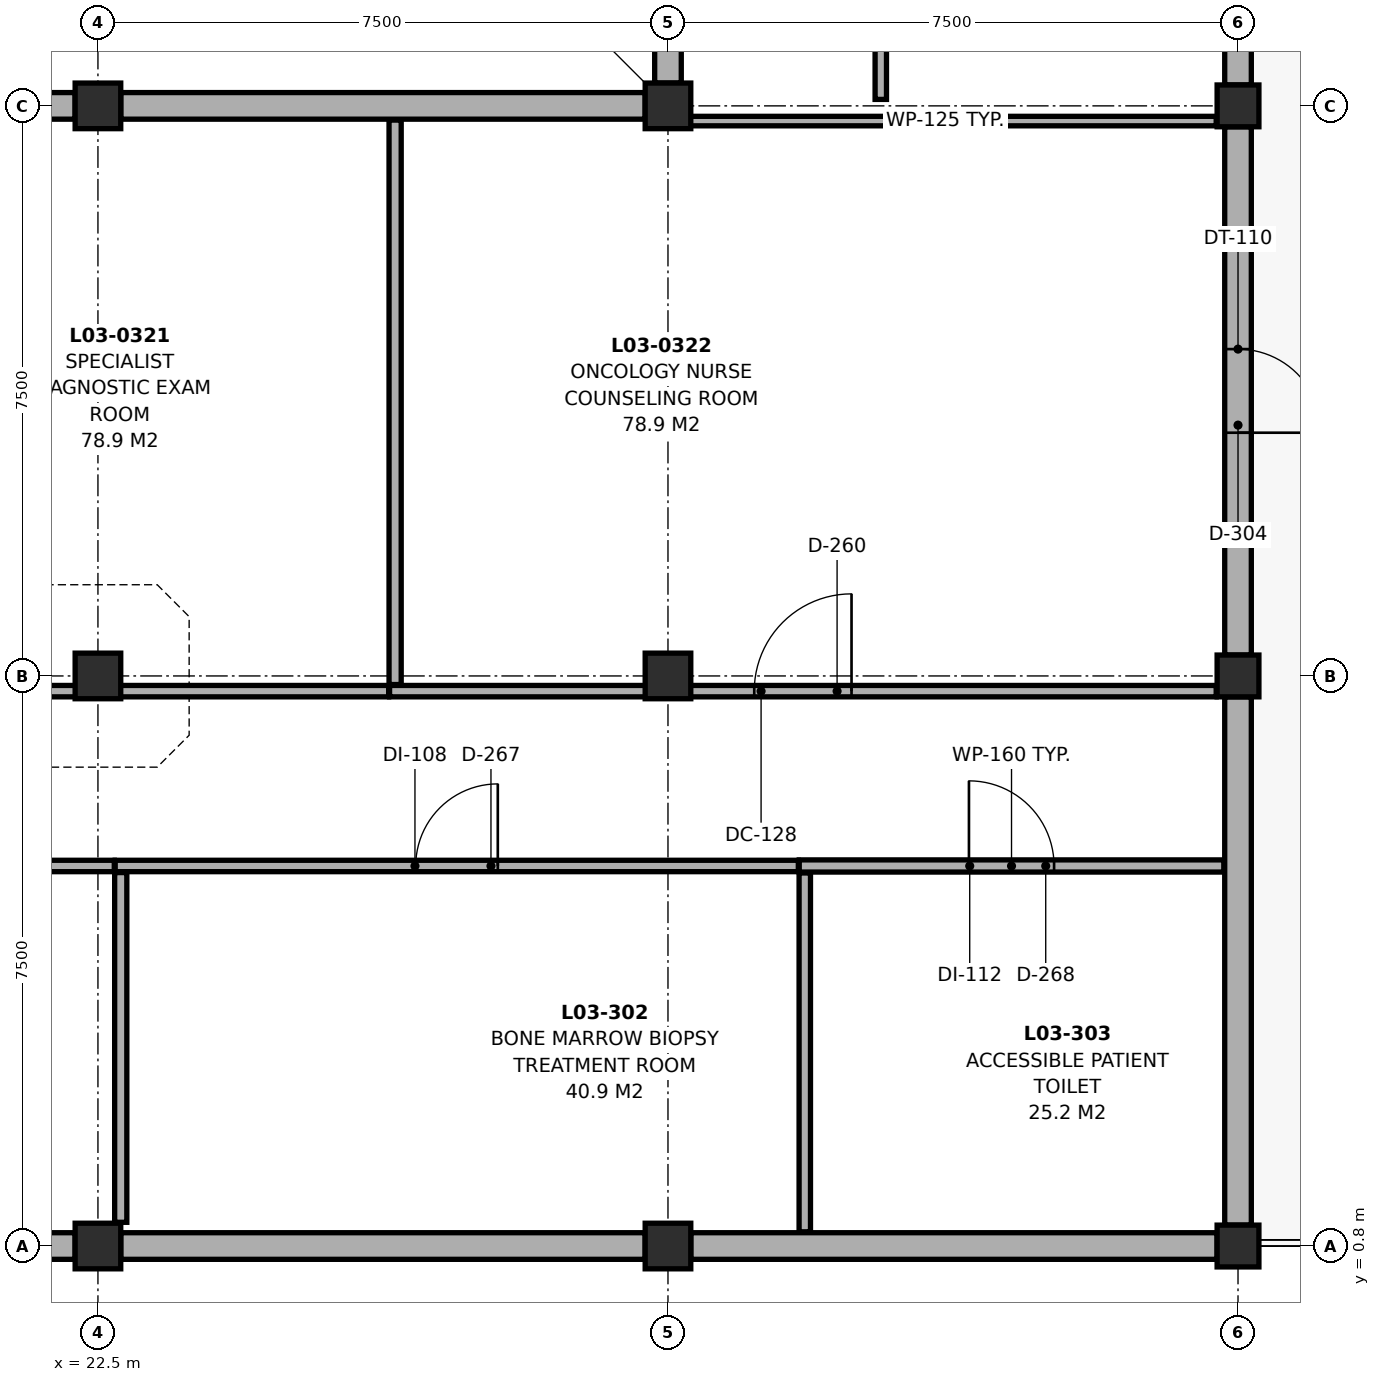
"""IFC4 building model, lengths in metres.
Left out: names, types, materials, properties, quantities, classifications, styles, units other than length and angle.
Written with IfcOpenShell. Run it as: python <this file> out.ifc"""

import sys

from ifc_helpers import new_model, si_unit, direction, frame, frame_2d, origin, origin_2d, place, context, subcontext, project, spatial, rectangle, extrude, element, fill, save


model = new_model("IFC4")
c1 = context("Model", 3, precision=1e-05, world=origin(), true_north=direction((0.0, 1.0)))
c2 = subcontext(c1, "Body", "Model", "MODEL_VIEW")
j1 = project(units=[si_unit("LENGTHUNIT", "METRE"), si_unit("PLANEANGLEUNIT", "RADIAN")], contexts=[c1])
p1 = place(None, origin())
s1 = spatial("IfcSite", under=j1, at=p1, CompositionType="ELEMENT")
p2 = place(p1, origin())
s2 = spatial("IfcBuilding", under=s1, at=p2, CompositionType="ELEMENT")
p3 = place(p2, frame((0.0, 0.0, 13.5)))
s3 = spatial("IfcBuildingStorey", under=s2, at=p3, CompositionType="ELEMENT", Elevation=13.5)
for number, where, z_axis, x_axis in (
    (1, (22.5, 0.8, 0.0), (0.0, 0.0, 1.0), (1.0, 0.0, 0.0)),
    (2, (22.5, 8.3, 0.0), (0.0, 0.0, 1.0), (1.0, 0.0, 0.0)),
    (3, (22.5, 15.8, 0.0), (0.0, 0.0, 1.0), (1.0, 0.0, 0.0)),
    (4, (30.0, 0.8, 0.0), (0.0, 0.0, 1.0), (1.0, 0.0, 0.0)),
    (5, (30.0, 8.3, 0.0), (0.0, 0.0, 1.0), (1.0, 0.0, 0.0)),
    (6, (30.0, 15.8, 0.0), (0.0, 0.0, 1.0), (1.0, 0.0, 0.0)),
):
    element("IfcColumn", number, at=place(p3, frame(where, z_axis=z_axis, x_axis=x_axis)), inside=s3, PredefinedType="COLUMN", context=c2, shape_type="SweptSolid", body=[
        extrude(rectangle(XDim=0.6, YDim=0.6, at=origin_2d()), origin(), (0.0, 0.0, 1.0), 3.72),
    ])
for number, where, z_axis, x_axis in (
    (7, (37.5, 0.8, 0.0), (0.0, 0.0, 1.0), (1.0, 0.0, 0.0)),
    (8, (37.5, 8.3, 0.0), (0.0, 0.0, 1.0), (1.0, 0.0, 0.0)),
    (9, (37.5, 15.8, 0.0), (0.0, 0.0, 1.0), (1.0, 0.0, 0.0)),
):
    element("IfcColumn", number, at=place(p3, frame(where, z_axis=z_axis, x_axis=x_axis)), inside=s3, PredefinedType="COLUMN", context=c2, shape_type="SweptSolid", body=[
        extrude(rectangle(XDim=0.55, YDim=0.55, at=origin_2d()), origin(), (0.0, 0.0, 1.0), 3.75),
    ])
p4 = place(p3, frame((37.5, 23.05, 0.0), z_axis=(0.0, 0.0, 1.0), x_axis=(0.0, -1.0, 0.0)))
e10 = element("IfcWall", 10, at=p4, inside=s3, PredefinedType="SOLIDWALL", context=c2, shape_type="SweptSolid", body=[
    extrude(rectangle(XDim=6.975, YDim=0.35, at=frame_2d((3.488, 0.0))), origin(), (0.0, 0.0, 1.0), 3.055),
])
p5 = place(p3, frame((37.5, 15.525, 0.0), z_axis=(0.0, 0.0, 1.0), x_axis=(0.0, -1.0, 0.0)))
e11 = element("IfcWall", 11, at=p5, inside=s3, PredefinedType="SOLIDWALL", context=c2, shape_type="SweptSolid", body=[
    extrude(rectangle(XDim=6.95, YDim=0.35, at=frame_2d((3.475, 0.0))), origin(), (0.0, 0.0, 1.0), 3.005),
])
p6 = place(p5, frame((2.925, 0.0, 0.0)))
e12 = element("IfcOpeningElement", 12, at=p6, cuts=e11, PredefinedType="OPENING", context=c2, shape_type="SweptSolid", body=[
    extrude(rectangle(XDim=1.1, YDim=2.15, at=frame_2d((0.55, 1.075))), frame((0.0, 0.187, 0.0), z_axis=(0.0, -1.0, 0.0), x_axis=(1.0, 0.0, 0.0)), (0.0, 0.0, 1.0), 0.374),
])
p7 = place(p3, frame((37.5, 8.025, 0.0), z_axis=(0.0, 0.0, 1.0), x_axis=(0.0, -1.0, 0.0)))
e13 = element("IfcWall", 13, at=p7, inside=s3, PredefinedType="SOLIDWALL", context=c2, shape_type="SweptSolid", body=[
    extrude(rectangle(XDim=6.95, YDim=0.35, at=frame_2d((3.475, 0.0))), origin(), (0.0, 0.0, 1.0), 3.005),
])
p8 = place(p3, frame((37.225, 0.8, 0.0), z_axis=(0.0, 0.0, 1.0), x_axis=(-1.0, 0.0, 0.0)))
e14 = element("IfcWall", 14, at=p8, inside=s3, PredefinedType="SOLIDWALL", context=c2, shape_type="SweptSolid", body=[
    extrude(rectangle(XDim=6.925, YDim=0.35, at=frame_2d((3.462, 0.0))), origin(), (0.0, 0.0, 1.0), 3.005),
])
p9 = place(p3, frame((29.7, 0.8, 0.0), z_axis=(0.0, 0.0, 1.0), x_axis=(-1.0, 0.0, 0.0)))
e15 = element("IfcWall", 15, at=p9, inside=s3, PredefinedType="SOLIDWALL", context=c2, shape_type="SweptSolid", body=[
    extrude(rectangle(XDim=6.9, YDim=0.35, at=frame_2d((3.45, 0.0))), origin(), (0.0, 0.0, 1.0), 2.805),
])
p10 = place(p3, frame((22.2, 0.8, 0.0), z_axis=(0.0, 0.0, 1.0), x_axis=(-1.0, 0.0, 0.0)))
e16 = element("IfcWall", 16, at=p10, inside=s3, PredefinedType="SOLIDWALL", context=c2, shape_type="SweptSolid", body=[
    extrude(rectangle(XDim=6.9, YDim=0.35, at=frame_2d((3.45, 0.0))), origin(), (0.0, 0.0, 1.0), 2.805),
])
p11 = place(p10, frame((2.65, 0.0, 0.9)))
e17 = element("IfcOpeningElement", 17, at=p11, cuts=e16, PredefinedType="OPENING", context=c2, shape_type="SweptSolid", body=[
    extrude(rectangle(XDim=1.6, YDim=1.3, at=frame_2d((0.8, 0.65))), frame((0.0, 0.187, 0.0), z_axis=(0.0, -1.0, 0.0), x_axis=(1.0, 0.0, 0.0)), (0.0, 0.0, 1.0), 0.374),
])
for number, where, z_axis, x_axis in (
    (18, (15.3, 15.8, 0.0), (0.0, 0.0, 1.0), (1.0, 0.0, 0.0)),
    (19, (22.8, 15.8, 0.0), (0.0, 0.0, 1.0), (1.0, 0.0, 0.0)),
):
    element("IfcWall", number, at=place(p3, frame(where, z_axis=z_axis, x_axis=x_axis)), inside=s3, PredefinedType="SOLIDWALL", context=c2, shape_type="SweptSolid", body=[
        extrude(rectangle(XDim=6.9, YDim=0.35, at=frame_2d((3.45, 0.0))), origin(), (0.0, 0.0, 1.0), 2.805),
    ])
p12 = place(p3, frame((30.0, 16.1, 0.0), z_axis=(0.0, 0.0, 1.0), x_axis=(0.0, 1.0, 0.0)))
e20 = element("IfcWall", 20, at=p12, inside=s3, PredefinedType="SOLIDWALL", context=c2, shape_type="SweptSolid", body=[
    extrude(rectangle(XDim=6.95, YDim=0.35, at=frame_2d((3.475, 0.0))), origin(), (0.0, 0.0, 1.0), 3.055),
])
p13 = place(p12, frame((2.575, 0.0, 0.9)))
e21 = element("IfcOpeningElement", 21, at=p13, cuts=e20, PredefinedType="OPENING", context=c2, shape_type="SweptSolid", body=[
    extrude(rectangle(XDim=1.8, YDim=1.7, at=frame_2d((0.9, 0.85))), frame((0.0, 0.187, 0.0), z_axis=(0.0, -1.0, 0.0), x_axis=(1.0, 0.0, 0.0)), (0.0, 0.0, 1.0), 0.374),
])
p14 = place(p3, frame((15.485, 5.8, 0.0), z_axis=(0.0, 0.0, 1.0), x_axis=(1.0, 0.0, 0.0)))
e22 = element("IfcWall", 22, at=p14, inside=s3, PredefinedType="PARTITIONING", context=c2, shape_type="SweptSolid", body=[
    extrude(rectangle(XDim=7.23, YDim=0.15, at=frame_2d((3.615, 0.0))), origin(), (0.0, 0.0, 1.0), 2.805),
])
p15 = place(p14, frame((3.125, 0.0, 0.0)))
e23 = element("IfcOpeningElement", 23, at=p15, cuts=e22, PredefinedType="OPENING", context=c2, shape_type="SweptSolid", body=[
    extrude(rectangle(XDim=0.98, YDim=2.12, at=frame_2d((0.49, 1.06))), frame((0.0, 0.087, 0.0), z_axis=(0.0, -1.0, 0.0), x_axis=(1.0, 0.0, 0.0)), (0.0, 0.0, 1.0), 0.174),
])
p16 = place(p3, frame((22.727, 5.8, 0.0), z_axis=(0.0, 0.0, 1.0), x_axis=(1.0, 0.0, 0.0)))
e24 = element("IfcWall", 24, at=p16, inside=s3, PredefinedType="PARTITIONING", context=c2, shape_type="SweptSolid", body=[
    extrude(rectangle(XDim=8.988, YDim=0.15, at=frame_2d((4.494, 0.0))), origin(), (0.0, 0.0, 1.0), 2.805),
])
p17 = place(p16, frame((3.954, 0.0, 0.0)))
e25 = element("IfcOpeningElement", 25, at=p17, cuts=e24, PredefinedType="OPENING", context=c2, shape_type="SweptSolid", body=[
    extrude(rectangle(XDim=1.08, YDim=2.18, at=frame_2d((0.54, 1.09))), frame((0.0, 0.087, 0.0), z_axis=(0.0, -1.0, 0.0), x_axis=(1.0, 0.0, 0.0)), (0.0, 0.0, 1.0), 0.174),
])
p18 = place(p3, frame((31.727, 5.8, 0.0), z_axis=(0.0, 0.0, 1.0), x_axis=(1.0, 0.0, 0.0)))
e26 = element("IfcWall", 26, at=p18, inside=s3, PredefinedType="PARTITIONING", context=c2, shape_type="SweptSolid", body=[
    extrude(rectangle(XDim=5.586, YDim=0.16, at=frame_2d((2.793, 0.0))), origin(), (0.0, 0.0, 1.0), 3.085),
])
p19 = place(p18, frame((2.233, 0.0, 0.0)))
e27 = element("IfcOpeningElement", 27, at=p19, cuts=e26, PredefinedType="OPENING", context=c2, shape_type="SweptSolid", body=[
    extrude(rectangle(XDim=1.12, YDim=2.2, at=frame_2d((0.56, 1.1))), frame((0.0, 0.092, 0.0), z_axis=(0.0, -1.0, 0.0), x_axis=(1.0, 0.0, 0.0)), (0.0, 0.0, 1.0), 0.184),
])
p20 = place(p3, frame((15.312, 8.1, 0.0), z_axis=(0.0, 0.0, 1.0), x_axis=(1.0, 0.0, 0.0)))
e28 = element("IfcWall", 28, at=p20, inside=s3, PredefinedType="PARTITIONING", context=c2, shape_type="SweptSolid", body=[
    extrude(rectangle(XDim=11.013, YDim=0.15, at=frame_2d((5.506, 0.0))), origin(), (0.0, 0.0, 1.0), 2.805),
])
p21 = place(p20, frame((4.886, 0.0, 0.0)))
e29 = element("IfcOpeningElement", 29, at=p21, cuts=e28, PredefinedType="OPENING", context=c2, shape_type="SweptSolid", body=[
    extrude(rectangle(XDim=1.24, YDim=2.2, at=frame_2d((0.62, 1.1))), frame((0.0, 0.087, 0.0), z_axis=(0.0, -1.0, 0.0), x_axis=(1.0, 0.0, 0.0)), (0.0, 0.0, 1.0), 0.174),
])
p22 = place(p3, frame((26.337, 8.1, 0.0), z_axis=(0.0, 0.0, 1.0), x_axis=(1.0, 0.0, 0.0)))
e30 = element("IfcWall", 30, at=p22, inside=s3, PredefinedType="PARTITIONING", context=c2, shape_type="SweptSolid", body=[
    extrude(rectangle(XDim=10.876, YDim=0.15, at=frame_2d((5.438, 0.0))), origin(), (0.0, 0.0, 1.0), 2.805),
])
p23 = place(p22, frame((4.798, 0.0, 0.0)))
e31 = element("IfcOpeningElement", 31, at=p23, cuts=e30, PredefinedType="OPENING", context=c2, shape_type="SweptSolid", body=[
    extrude(rectangle(XDim=1.28, YDim=2.22, at=frame_2d((0.64, 1.11))), frame((0.0, 0.087, 0.0), z_axis=(0.0, -1.0, 0.0), x_axis=(1.0, 0.0, 0.0)), (0.0, 0.0, 1.0), 0.174),
])
p24 = place(p3, frame((32.8, 15.885, 0.0), z_axis=(0.0, 0.0, 1.0), x_axis=(0.0, 1.0, 0.0)))
e32 = element("IfcWall", 32, at=p24, inside=s3, PredefinedType="PARTITIONING", context=c2, shape_type="SweptSolid", body=[
    extrude(rectangle(XDim=7.33, YDim=0.15, at=frame_2d((3.665, 0.0))), origin(), (0.0, 0.0, 1.0), 3.055),
])
p25 = place(p24, frame((2.945, 0.0, 0.0)))
e33 = element("IfcOpeningElement", 33, at=p25, cuts=e32, PredefinedType="OPENING", context=c2, shape_type="SweptSolid", body=[
    extrude(rectangle(XDim=1.44, YDim=2.32, at=frame_2d((0.72, 1.16))), frame((0.0, 0.087, 0.0), z_axis=(0.0, -1.0, 0.0), x_axis=(1.0, 0.0, 0.0)), (0.0, 0.0, 1.0), 0.174),
])
p26 = place(p3, frame((30.084, 15.6, 0.0), z_axis=(0.0, 0.0, 1.0), x_axis=(1.0, 0.0, 0.0)))
e34 = element("IfcWall", 34, at=p26, inside=s3, PredefinedType="PARTITIONING", context=c2, shape_type="SweptSolid", body=[
    extrude(rectangle(XDim=7.128, YDim=0.125, at=frame_2d((3.564, 0.0))), origin(), (0.0, 0.0, 1.0), 3.005),
])
p27 = place(p3, frame((22.8, 1.112, 0.0), z_axis=(0.0, 0.0, 1.0), x_axis=(0.0, 1.0, 0.0)))
e35 = element("IfcWall", 35, at=p27, inside=s3, PredefinedType="PARTITIONING", context=c2, shape_type="SweptSolid", body=[
    extrude(rectangle(XDim=4.601, YDim=0.16, at=frame_2d((2.3, 0.0))), origin(), (0.0, 0.0, 1.0), 2.805),
])
p28 = place(p3, frame((31.8, 0.987, 0.0), z_axis=(0.0, 0.0, 1.0), x_axis=(0.0, 1.0, 0.0)))
e36 = element("IfcWall", 36, at=p28, inside=s3, PredefinedType="PARTITIONING", context=c2, shape_type="SweptSolid", body=[
    extrude(rectangle(XDim=4.721, YDim=0.15, at=frame_2d((2.36, 0.0))), origin(), (0.0, 0.0, 1.0), 3.055),
])
p29 = place(p3, frame((26.41, 8.187, 0.0), z_axis=(0.0, 0.0, 1.0), x_axis=(0.0, 1.0, 0.0)))
e37 = element("IfcWall", 37, at=p29, inside=s3, PredefinedType="PARTITIONING", context=c2, shape_type="SweptSolid", body=[
    extrude(rectangle(XDim=7.426, YDim=0.16, at=frame_2d((3.713, 0.0))), origin(), (0.0, 0.0, 1.0), 2.805),
])
p30 = place(p6, origin())
e38 = element("IfcDoor", 38, at=p30, inside=s3, OperationType="SINGLE_SWING_RIGHT", PredefinedType="DOOR", context=c2, shape_type="SweptSolid", body=[
    extrude(rectangle(XDim=1.1, YDim=2.15, at=frame_2d((0.55, 1.075))), frame((0.0, 0.025, 0.0), z_axis=(0.0, -1.0, 0.0), x_axis=(1.0, 0.0, 0.0)), (0.0, 0.0, 1.0), 0.05),
])
fill(e12, e38)
p31 = place(p17, origin())
e39 = element("IfcDoor", 39, at=p31, inside=s3, OperationType="SINGLE_SWING_RIGHT", PredefinedType="DOOR", context=c2, shape_type="SweptSolid", body=[
    extrude(rectangle(XDim=1.08, YDim=2.18, at=frame_2d((0.54, 1.09))), frame((0.0, 0.025, 0.0), z_axis=(0.0, -1.0, 0.0), x_axis=(1.0, 0.0, 0.0)), (0.0, 0.0, 1.0), 0.05),
])
fill(e25, e39)
p32 = place(p19, origin())
e40 = element("IfcDoor", 40, at=p32, inside=s3, OperationType="SINGLE_SWING_LEFT", PredefinedType="DOOR", context=c2, shape_type="SweptSolid", body=[
    extrude(rectangle(XDim=1.12, YDim=2.2, at=frame_2d((0.56, 1.1))), frame((0.0, 0.025, 0.0), z_axis=(0.0, -1.0, 0.0), x_axis=(1.0, 0.0, 0.0)), (0.0, 0.0, 1.0), 0.05),
])
fill(e27, e40)
p33 = place(p23, origin())
e41 = element("IfcDoor", 41, at=p33, inside=s3, OperationType="SINGLE_SWING_RIGHT", PredefinedType="DOOR", context=c2, shape_type="SweptSolid", body=[
    extrude(rectangle(XDim=1.28, YDim=2.22, at=frame_2d((0.64, 1.11))), frame((0.0, 0.025, 0.0), z_axis=(0.0, -1.0, 0.0), x_axis=(1.0, 0.0, 0.0)), (0.0, 0.0, 1.0), 0.05),
])
fill(e31, e41)
save(model, sys.argv[1])
